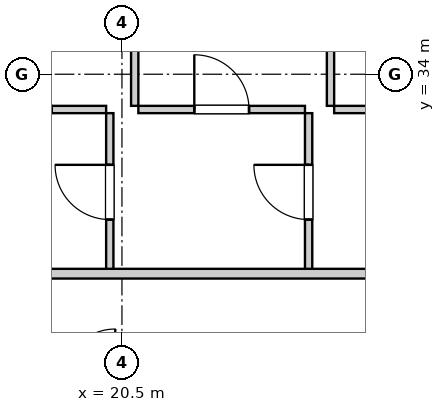
"""IFC4 building model, lengths in metres.
Left out: names, types, materials, properties, quantities, classifications, styles, units other than length and angle.
Written with IfcOpenShell. Run it as: python <this file> out.ifc"""

import sys

from ifc_helpers import new_model, si_unit, direction, frame, frame_2d, origin, place, context, subcontext, project, spatial, rectangle, extrude, element, fill, save


model = new_model("IFC4")
c1 = context("Model", 3, precision=1e-05, world=origin(), true_north=direction((0.0, 1.0)))
c2 = subcontext(c1, "Body", "Model", "MODEL_VIEW")
j1 = project(units=[si_unit("LENGTHUNIT", "METRE"), si_unit("PLANEANGLEUNIT", "RADIAN")], contexts=[c1])
p1 = place(None, origin())
s1 = spatial("IfcSite", under=j1, at=p1, CompositionType="ELEMENT")
p2 = place(p1, origin())
s2 = spatial("IfcBuilding", under=s1, at=p2, CompositionType="ELEMENT")
p3 = place(p2, frame((0.0, 0.0, 41.8)))
s3 = spatial("IfcBuildingStorey", under=s2, at=p3, CompositionType="ELEMENT", Elevation=41.8)
p4 = place(p3, frame((20.3, 30.76, 0.0), z_axis=(0.0, 0.0, 1.0), x_axis=(0.0, 1.0, 0.0)))
e1 = element("IfcWall", 1, at=p4, inside=s3, PredefinedType="PARTITIONING", context=c2, shape_type="SweptSolid", body=[
    extrude(rectangle(XDim=2.6, YDim=0.12, at=frame_2d((1.3, 0.0))), origin(), (0.0, 0.0, 1.0), 2.94),
])
p5 = place(p4, frame((0.85, 0.0, 0.0)))
e2 = element("IfcOpeningElement", 2, at=p5, cuts=e1, PredefinedType="OPENING", context=c2, shape_type="SweptSolid", body=[
    extrude(rectangle(XDim=0.9, YDim=2.05, at=frame_2d((0.45, 1.025))), frame((0.0, 0.07, 0.0), z_axis=(0.0, -1.0, 0.0), x_axis=(1.0, 0.0, 0.0)), (0.0, 0.0, 1.0), 0.14),
])
p6 = place(p3, frame((17.55, 33.42, 0.0), z_axis=(0.0, 0.0, 1.0), x_axis=(1.0, 0.0, 0.0)))
e3 = element("IfcWall", 3, at=p6, inside=s3, PredefinedType="PARTITIONING", context=c2, shape_type="SweptSolid", body=[
    extrude(rectangle(XDim=2.69, YDim=0.12, at=frame_2d((1.345, 0.0))), origin(), (0.0, 0.0, 1.0), 2.94),
])
p7 = place(p6, frame((0.895, 0.0, 0.0)))
e4 = element("IfcOpeningElement", 4, at=p7, cuts=e3, PredefinedType="OPENING", context=c2, shape_type="SweptSolid", body=[
    extrude(rectangle(XDim=0.9, YDim=2.05, at=frame_2d((0.45, 1.025))), frame((0.0, 0.07, 0.0), z_axis=(0.0, -1.0, 0.0), x_axis=(1.0, 0.0, 0.0)), (0.0, 0.0, 1.0), 0.14),
])
p8 = place(p3, frame((23.57, 30.76, 0.0), z_axis=(0.0, 0.0, 1.0), x_axis=(0.0, 1.0, 0.0)))
e5 = element("IfcWall", 5, at=p8, inside=s3, PredefinedType="PARTITIONING", context=c2, shape_type="SweptSolid", body=[
    extrude(rectangle(XDim=2.6, YDim=0.12, at=frame_2d((1.3, 0.0))), origin(), (0.0, 0.0, 1.0), 2.94),
])
p9 = place(p8, frame((0.85, 0.0, 0.0)))
e6 = element("IfcOpeningElement", 6, at=p9, cuts=e5, PredefinedType="OPENING", context=c2, shape_type="SweptSolid", body=[
    extrude(rectangle(XDim=0.9, YDim=2.05, at=frame_2d((0.45, 1.025))), frame((0.0, 0.07, 0.0), z_axis=(0.0, -1.0, 0.0), x_axis=(1.0, 0.0, 0.0)), (0.0, 0.0, 1.0), 0.14),
])
p10 = place(p3, frame((20.77, 33.42, 0.0), z_axis=(0.0, 0.0, 1.0), x_axis=(1.0, 0.0, 0.0)))
e7 = element("IfcWall", 7, at=p10, inside=s3, PredefinedType="PARTITIONING", context=c2, shape_type="SweptSolid", body=[
    extrude(rectangle(XDim=2.74, YDim=0.12, at=frame_2d((1.37, 0.0))), origin(), (0.0, 0.0, 1.0), 2.94),
])
p11 = place(p10, frame((0.92, 0.0, 0.0)))
e8 = element("IfcOpeningElement", 8, at=p11, cuts=e7, PredefinedType="OPENING", context=c2, shape_type="SweptSolid", body=[
    extrude(rectangle(XDim=0.9, YDim=2.05, at=frame_2d((0.45, 1.025))), frame((0.0, 0.07, 0.0), z_axis=(0.0, -1.0, 0.0), x_axis=(1.0, 0.0, 0.0)), (0.0, 0.0, 1.0), 0.14),
])
p12 = place(p3, frame((23.99, 33.42, 0.0), z_axis=(0.0, 0.0, 1.0), x_axis=(1.0, 0.0, 0.0)))
e9 = element("IfcWall", 9, at=p12, inside=s3, PredefinedType="PARTITIONING", context=c2, shape_type="SweptSolid", body=[
    extrude(rectangle(XDim=3.1, YDim=0.12, at=frame_2d((1.55, 0.0))), origin(), (0.0, 0.0, 1.0), 2.94),
])
p13 = place(p12, frame((1.1, 0.0, 0.0)))
e10 = element("IfcOpeningElement", 10, at=p13, cuts=e9, PredefinedType="OPENING", context=c2, shape_type="SweptSolid", body=[
    extrude(rectangle(XDim=0.9, YDim=2.05, at=frame_2d((0.45, 1.025))), frame((0.0, 0.07, 0.0), z_axis=(0.0, -1.0, 0.0), x_axis=(1.0, 0.0, 0.0)), (0.0, 0.0, 1.0), 0.14),
])
p14 = place(p3, frame((20.71, 33.48, 0.0), z_axis=(0.0, 0.0, 1.0), x_axis=(0.0, 1.0, 0.0)))
e11 = element("IfcWall", 11, at=p14, inside=s3, PredefinedType="PARTITIONING", context=c2, shape_type="SweptSolid", body=[
    extrude(rectangle(XDim=13.84, YDim=0.12, at=frame_2d((6.92, 0.0))), origin(), (0.0, 0.0, 1.0), 2.94),
])
p15 = place(p14, frame((6.455, 0.0, 0.0)))
e12 = element("IfcOpeningElement", 12, at=p15, cuts=e11, PredefinedType="OPENING", context=c2, shape_type="SweptSolid", body=[
    extrude(rectangle(XDim=0.9, YDim=2.05, at=frame_2d((0.45, 1.025))), frame((0.0, 0.07, 0.0), z_axis=(0.0, -1.0, 0.0), x_axis=(1.0, 0.0, 0.0)), (0.0, 0.0, 1.0), 0.14),
])
p16 = place(p3, frame((23.93, 33.48, 0.0), z_axis=(0.0, 0.0, 1.0), x_axis=(0.0, 1.0, 0.0)))
e13 = element("IfcWall", 13, at=p16, inside=s3, PredefinedType="PARTITIONING", context=c2, shape_type="SweptSolid", body=[
    extrude(rectangle(XDim=13.84, YDim=0.12, at=frame_2d((6.92, 0.0))), origin(), (0.0, 0.0, 1.0), 2.94),
])
p17 = place(p16, frame((6.455, 0.0, 0.0)))
e14 = element("IfcOpeningElement", 14, at=p17, cuts=e13, PredefinedType="OPENING", context=c2, shape_type="SweptSolid", body=[
    extrude(rectangle(XDim=0.9, YDim=2.05, at=frame_2d((0.45, 1.025))), frame((0.0, 0.07, 0.0), z_axis=(0.0, -1.0, 0.0), x_axis=(1.0, 0.0, 0.0)), (0.0, 0.0, 1.0), 0.14),
])
p18 = place(p3, frame((10.05, 30.72, 0.0), z_axis=(0.0, 0.0, 1.0), x_axis=(1.0, 0.0, 0.0)))
e15 = element("IfcWall", 15, at=p18, inside=s3, PredefinedType="PARTITIONING", context=c2, shape_type="SweptSolid", body=[
    extrude(rectangle(XDim=33.9, YDim=0.16, at=frame_2d((16.95, 0.0))), origin(), (0.0, 0.0, 1.0), 2.94),
])
p19 = place(p18, frame((4.035, 0.0, 0.0)))
e16 = element("IfcOpeningElement", 16, at=p19, cuts=e15, PredefinedType="OPENING", context=c2, shape_type="SweptSolid", body=[
    extrude(rectangle(XDim=0.95, YDim=2.1, at=frame_2d((0.475, 1.05))), frame((0.0, 0.09, 0.0), z_axis=(0.0, -1.0, 0.0), x_axis=(1.0, 0.0, 0.0)), (0.0, 0.0, 1.0), 0.18),
])
p20 = place(p5, origin())
e17 = element("IfcDoor", 17, at=p20, inside=s3, OperationType="SINGLE_SWING_RIGHT", PredefinedType="DOOR", context=c2, shape_type="SweptSolid", body=[
    extrude(rectangle(XDim=0.9, YDim=2.05, at=frame_2d((0.45, 1.025))), frame((0.0, 0.025, 0.0), z_axis=(0.0, -1.0, 0.0), x_axis=(1.0, 0.0, 0.0)), (0.0, 0.0, 1.0), 0.05),
])
fill(e2, e17)
p21 = place(p9, origin())
e18 = element("IfcDoor", 18, at=p21, inside=s3, OperationType="SINGLE_SWING_RIGHT", PredefinedType="DOOR", context=c2, shape_type="SweptSolid", body=[
    extrude(rectangle(XDim=0.9, YDim=2.05, at=frame_2d((0.45, 1.025))), frame((0.0, 0.025, 0.0), z_axis=(0.0, -1.0, 0.0), x_axis=(1.0, 0.0, 0.0)), (0.0, 0.0, 1.0), 0.05),
])
fill(e6, e18)
p22 = place(p11, origin())
e19 = element("IfcDoor", 19, at=p22, inside=s3, OperationType="SINGLE_SWING_LEFT", PredefinedType="DOOR", context=c2, shape_type="SweptSolid", body=[
    extrude(rectangle(XDim=0.9, YDim=2.05, at=frame_2d((0.45, 1.025))), frame((0.0, 0.025, 0.0), z_axis=(0.0, -1.0, 0.0), x_axis=(1.0, 0.0, 0.0)), (0.0, 0.0, 1.0), 0.05),
])
fill(e8, e19)
save(model, sys.argv[1])
